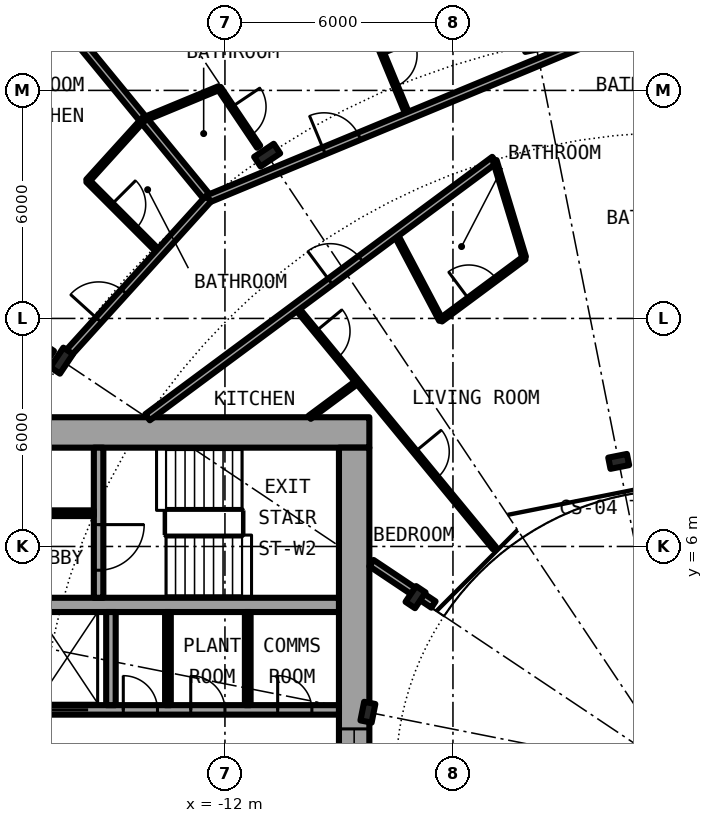
"""IFC4 building model, lengths in metres.
Left out: names, types, materials, properties, quantities, classifications, styles, units other than length and angle.
Written with IfcOpenShell. Run it as: python <this file> out.ifc"""

import sys

from ifc_helpers import new_model, si_unit, direction, frame, frame_2d, origin, origin_2d, place, context, subcontext, project, spatial, rectangle, i_section, extrude, element, fill, save


model = new_model("IFC4")
c1 = context("Model", 3, precision=1e-05, world=origin(), true_north=direction((0.0, 1.0)))
c2 = subcontext(c1, "Body", "Model", "MODEL_VIEW")
j1 = project(units=[si_unit("LENGTHUNIT", "METRE"), si_unit("PLANEANGLEUNIT", "RADIAN")], contexts=[c1])
p1 = place(None, origin())
s1 = spatial("IfcSite", under=j1, at=p1, CompositionType="ELEMENT")
p2 = place(p1, origin())
s2 = spatial("IfcBuilding", under=s1, at=p2, CompositionType="ELEMENT")
p3 = place(p2, frame((0.0, 0.0, 47.2)))
s3 = spatial("IfcBuildingStorey", under=s2, at=p3, CompositionType="ELEMENT", Elevation=47.2)
for number, where, z_axis, x_axis in (
    (1, (-10.889, 16.297, 0.0), (0.0, 0.0, 1.0), (-0.556, 0.831, 0.0)),
    (2, (-16.297, 10.889, 0.0), (0.0, 0.0, 1.0), (-0.831, 0.556, 0.0)),
):
    element("IfcColumn", number, at=place(p3, frame(where, z_axis=z_axis, x_axis=x_axis)), inside=s3, PredefinedType="COLUMN", context=c2, shape_type="SweptSolid", body=[
        extrude(i_section(OverallWidth=0.305, OverallDepth=0.62, WebThickness=0.021, FlangeThickness=0.04, FilletRadius=0.027, at=origin_2d()), origin(), (0.0, 0.0, 1.0), 3.05),
    ])
for number, where, z_axis, x_axis in (
    (3, (-1.639, 8.239, 0.0), (0.0, 0.0, 1.0), (-0.195, 0.981, 0.0)),
    (4, (-6.984, 4.667, 0.0), (0.0, 0.0, 1.0), (-0.831, 0.556, 0.0)),
    (5, (-8.239, 1.639, 0.0), (0.0, 0.0, 1.0), (-0.981, 0.195, 0.0)),
):
    element("IfcColumn", number, at=place(p3, frame(where, z_axis=z_axis, x_axis=x_axis)), inside=s3, PredefinedType="COLUMN", context=c2, shape_type="SweptSolid", body=[
        extrude(i_section(OverallWidth=0.3, OverallDepth=0.5, WebThickness=0.014, FlangeThickness=0.028, FilletRadius=0.027, at=origin_2d()), origin(), (0.0, 0.0, 1.0), 3.05),
    ])
p4 = place(p3, frame((-8.2, 9.0, 0.0), z_axis=(0.0, 0.0, 1.0), x_axis=(-1.0, 0.0, 0.0)))
e6 = element("IfcWall", 6, at=p4, inside=s3, PredefinedType="SHEAR", context=c2, shape_type="SweptSolid", body=[
    extrude(rectangle(XDim=14.2, YDim=0.8, at=frame_2d((7.1, 0.0))), origin(), (0.0, 0.0, 1.0), 3.05),
])
p5 = place(p4, frame((11.675, 0.0, 0.0)))
e7 = element("IfcOpeningElement", 7, at=p5, cuts=e6, PredefinedType="OPENING", context=c2, shape_type="SweptSolid", body=[
    extrude(rectangle(XDim=1.2, YDim=2.3, at=frame_2d((0.6, 1.15))), frame((0.0, 0.41, 0.0), z_axis=(0.0, -1.0, 0.0), x_axis=(1.0, 0.0, 0.0)), (0.0, 0.0, 1.0), 0.82),
])
p6 = place(p3, frame((-8.6, 8.6, 0.0), z_axis=(0.0, 0.0, 1.0), x_axis=(0.0, -1.0, 0.0)))
e8 = element("IfcWall", 8, at=p6, inside=s3, PredefinedType="SHEAR", context=c2, shape_type="SweptSolid", body=[
    extrude(rectangle(XDim=17.2, YDim=0.8, at=frame_2d((8.6, 0.0))), origin(), (0.0, 0.0, 1.0), 3.05),
])
p7 = place(p6, frame((7.4, 0.0, 0.1)))
e9 = element("IfcOpeningElement", 9, at=p7, cuts=e8, PredefinedType="OPENING", context=c2, shape_type="SweptSolid", body=[
    extrude(rectangle(XDim=2.4, YDim=2.2, at=frame_2d((1.2, 1.1))), frame((0.0, 0.41, 0.0), z_axis=(0.0, -1.0, 0.0), x_axis=(1.0, 0.0, 0.0)), (0.0, 0.0, 1.0), 0.82),
])
p8 = place(p3, frame((-19.15, 1.7, 0.0), z_axis=(0.0, 0.0, 1.0), x_axis=(1.0, 0.0, 0.0)))
e10 = element("IfcWall", 10, at=p8, inside=s3, PredefinedType="SHEAR", context=c2, shape_type="SweptSolid", body=[
    extrude(rectangle(XDim=10.15, YDim=0.25, at=frame_2d((5.075, 0.0))), origin(), (0.0, 0.0, 1.0), 3.05),
])
p9 = place(p8, frame((2.45, 0.0, 0.0)))
e11 = element("IfcOpeningElement", 11, at=p9, cuts=e10, PredefinedType="OPENING", context=c2, shape_type="SweptSolid", body=[
    extrude(rectangle(XDim=1.1, YDim=2.3, at=frame_2d((0.55, 1.15))), frame((0.0, 0.135, 0.0), z_axis=(0.0, -1.0, 0.0), x_axis=(1.0, 0.0, 0.0)), (0.0, 0.0, 1.0), 0.27),
])
p10 = place(p8, frame((8.538, 0.0, 0.0)))
e12 = element("IfcOpeningElement", 12, at=p10, cuts=e10, PredefinedType="OPENING", context=c2, shape_type="SweptSolid", body=[
    extrude(rectangle(XDim=0.9, YDim=2.3, at=frame_2d((0.45, 1.15))), frame((0.0, 0.135, 0.0), z_axis=(0.0, -1.0, 0.0), x_axis=(1.0, 0.0, 0.0)), (0.0, 0.0, 1.0), 0.27),
])
p11 = place(p8, frame((6.25, 0.0, 0.0)))
e13 = element("IfcOpeningElement", 13, at=p11, cuts=e10, PredefinedType="OPENING", context=c2, shape_type="SweptSolid", body=[
    extrude(rectangle(XDim=0.9, YDim=2.3, at=frame_2d((0.45, 1.15))), frame((0.0, 0.135, 0.0), z_axis=(0.0, -1.0, 0.0), x_axis=(1.0, 0.0, 0.0)), (0.0, 0.0, 1.0), 0.27),
])
p12 = place(p8, frame((4.475, 0.0, 0.0)))
e14 = element("IfcOpeningElement", 14, at=p12, cuts=e10, PredefinedType="OPENING", context=c2, shape_type="SweptSolid", body=[
    extrude(rectangle(XDim=0.9, YDim=2.3, at=frame_2d((0.45, 1.15))), frame((0.0, 0.135, 0.0), z_axis=(0.0, -1.0, 0.0), x_axis=(1.0, 0.0, 0.0)), (0.0, 0.0, 1.0), 0.27),
])
p13 = place(p3, frame((-9.0, 4.462, 0.0), z_axis=(0.0, 0.0, 1.0), x_axis=(-1.0, 0.0, 0.0)))
e15 = element("IfcWall", 15, at=p13, inside=s3, PredefinedType="SHEAR", context=c2, shape_type="SweptSolid", body=[
    extrude(rectangle(XDim=10.15, YDim=0.375, at=frame_2d((5.075, 0.0))), origin(), (0.0, 0.0, 1.0), 3.05),
])
p14 = place(p3, frame((-15.325, 8.6, 0.0), z_axis=(0.0, 0.0, 1.0), x_axis=(0.0, -1.0, 0.0)))
e16 = element("IfcWall", 16, at=p14, inside=s3, PredefinedType="SHEAR", context=c2, shape_type="SweptSolid", body=[
    extrude(rectangle(XDim=3.95, YDim=0.25, at=frame_2d((1.975, 0.0))), origin(), (0.0, 0.0, 1.0), 3.05),
])
p15 = place(p14, frame((2.025, 0.0, 0.0)))
e17 = element("IfcOpeningElement", 17, at=p15, cuts=e16, PredefinedType="OPENING", context=c2, shape_type="SweptSolid", body=[
    extrude(rectangle(XDim=1.2, YDim=2.3, at=frame_2d((0.6, 1.15))), frame((0.0, 0.135, 0.0), z_axis=(0.0, -1.0, 0.0), x_axis=(1.0, 0.0, 0.0)), (0.0, 0.0, 1.0), 0.27),
])
p16 = place(p3, frame((-15.0, 1.825, 0.0), z_axis=(0.0, 0.0, 1.0), x_axis=(0.0, 1.0, 0.0)))
e18 = element("IfcWall", 18, at=p16, inside=s3, PredefinedType="SOLIDWALL", context=c2, shape_type="SweptSolid", body=[
    extrude(rectangle(XDim=2.45, YDim=0.25, at=frame_2d((1.225, 0.0))), origin(), (0.0, 0.0, 1.0), 2.7),
])
for number, where, z_axis, x_axis in (
    (19, (-11.4, 1.825, 0.0), (0.0, 0.0, 1.0), (0.0, 1.0, 0.0)),
    (20, (-13.5, 1.825, 0.0), (0.0, 0.0, 1.0), (0.0, 1.0, 0.0)),
):
    element("IfcWall", number, at=place(p3, frame(where, z_axis=z_axis, x_axis=x_axis)), inside=s3, PredefinedType="PARTITIONING", context=c2, shape_type="SweptSolid", body=[
        extrude(rectangle(XDim=2.45, YDim=0.15, at=frame_2d((1.225, 0.0))), origin(), (0.0, 0.0, 1.0), 2.7),
    ])
p17 = place(p3, frame((-15.45, 6.875, 0.0), z_axis=(0.0, 0.0, 1.0), x_axis=(-1.0, 0.0, 0.0)))
e21 = element("IfcWall", 21, at=p17, inside=s3, PredefinedType="PARTITIONING", context=c2, shape_type="SweptSolid", body=[
    extrude(rectangle(XDim=3.7, YDim=0.15, at=frame_2d((1.85, 0.0))), origin(), (0.0, 0.0, 1.0), 2.7),
])
p18 = place(p17, frame((1.4, 0.0, 0.0)))
e22 = element("IfcOpeningElement", 22, at=p18, cuts=e21, PredefinedType="OPENING", context=c2, shape_type="SweptSolid", body=[
    extrude(rectangle(XDim=0.9, YDim=2.3, at=frame_2d((0.45, 1.15))), frame((0.0, 0.085, 0.0), z_axis=(0.0, -1.0, 0.0), x_axis=(1.0, 0.0, 0.0)), (0.0, 0.0, 1.0), 0.17),
])
p19 = place(p3, frame((-10.398, 25.107, 0.0), z_axis=(0.0, 0.0, 1.0), x_axis=(0.382458509789, -0.923972666419, 0.0)))
e23 = element("IfcWall", 23, at=p19, inside=s3, PredefinedType="PARTITIONING", context=c2, shape_type="SweptSolid", body=[
    extrude(rectangle(XDim=8.419, YDim=0.1, at=frame_2d((4.209, 0.0))), origin(), (0.0, 0.0, 1.0), 2.7),
])
p20 = place(p19, frame((6.677, 0.0, 0.0)))
e24 = element("IfcOpeningElement", 24, at=p20, cuts=e23, PredefinedType="OPENING", context=c2, shape_type="SweptSolid", body=[
    extrude(rectangle(XDim=0.9, YDim=2.3, at=frame_2d((0.45, 1.15))), frame((0.0, 0.06, 0.0), z_axis=(0.0, -1.0, 0.0), x_axis=(1.0, 0.0, 0.0)), (0.0, 0.0, 1.0), 0.12),
])
p21 = place(p19, frame((2.468, 0.0, 0.0)))
e25 = element("IfcOpeningElement", 25, at=p21, cuts=e23, PredefinedType="OPENING", context=c2, shape_type="SweptSolid", body=[
    extrude(rectangle(XDim=0.9, YDim=2.3, at=frame_2d((0.45, 1.15))), frame((0.0, 0.06, 0.0), z_axis=(0.0, -1.0, 0.0), x_axis=(1.0, 0.0, 0.0)), (0.0, 0.0, 1.0), 0.12),
])
p22 = place(p3, frame((-22.596, 15.097, 0.0), z_axis=(0.0, 0.0, 1.0), x_axis=(0.831507055747, -0.555514190857, 0.0)))
e26 = element("IfcWall", 26, at=p22, inside=s3, PredefinedType="PARTITIONING", context=c2, shape_type="SweptSolid", body=[
    extrude(rectangle(XDim=7.265, YDim=0.2, at=frame_2d((3.633, 0.0))), origin(), (0.0, 0.0, 1.0), 2.7),
])
p23 = place(p3, frame((-17.243, 21.005, 0.0), z_axis=(0.0, 0.0, 1.0), x_axis=(0.63447412651, -0.772944100689, 0.0)))
e27 = element("IfcWall", 27, at=p23, inside=s3, PredefinedType="PARTITIONING", context=c2, shape_type="SweptSolid", body=[
    extrude(rectangle(XDim=7.576, YDim=0.2, at=frame_2d((3.788, 0.0))), origin(), (0.0, 0.0, 1.0), 2.7),
])
p24 = place(p3, frame((-15.612, 15.622, 0.0), z_axis=(0.0, 0.0, 1.0), x_axis=(0.706741540154, -0.707471833659, 0.0)))
e28 = element("IfcWall", 28, at=p24, inside=s3, PredefinedType="PARTITIONING", context=c2, shape_type="SweptSolid", body=[
    extrude(rectangle(XDim=2.674, YDim=0.1, at=frame_2d((1.337, 0.0))), origin(), (0.0, 0.0, 1.0), 2.7),
])
p25 = place(p24, frame((0.887, 0.0, 0.0)))
e29 = element("IfcOpeningElement", 29, at=p25, cuts=e28, PredefinedType="OPENING", context=c2, shape_type="SweptSolid", body=[
    extrude(rectangle(XDim=0.9, YDim=2.3, at=frame_2d((0.45, 1.15))), frame((0.0, 0.06, 0.0), z_axis=(0.0, -1.0, 0.0), x_axis=(1.0, 0.0, 0.0)), (0.0, 0.0, 1.0), 0.12),
])
p26 = place(p3, frame((-12.153, 18.064, 0.0), z_axis=(0.0, 0.0, 1.0), x_axis=(0.558084773293, -0.829783939239, 0.0)))
e30 = element("IfcWall", 30, at=p26, inside=s3, PredefinedType="PARTITIONING", context=c2, shape_type="SweptSolid", body=[
    extrude(rectangle(XDim=1.862, YDim=0.1, at=frame_2d((0.931, 0.0))), origin(), (0.0, 0.0, 1.0), 2.7),
])
p27 = place(p26, frame((0.6, 0.0, 0.0)))
e31 = element("IfcOpeningElement", 31, at=p27, cuts=e30, PredefinedType="OPENING", context=c2, shape_type="SweptSolid", body=[
    extrude(rectangle(XDim=0.9, YDim=2.3, at=frame_2d((0.45, 1.15))), frame((0.0, 0.06, 0.0), z_axis=(0.0, -1.0, 0.0), x_axis=(1.0, 0.0, 0.0)), (0.0, 0.0, 1.0), 0.12),
])
p28 = place(p3, frame((-10.132, 12.296, 0.0), z_axis=(0.0, 0.0, 1.0), x_axis=(0.635976043025, -0.771708800454, 0.0)))
e32 = element("IfcWall", 32, at=p28, inside=s3, PredefinedType="PARTITIONING", context=c2, shape_type="SweptSolid", body=[
    extrude(rectangle(XDim=8.213, YDim=0.1, at=frame_2d((4.106, 0.0))), origin(), (0.0, 0.0, 1.0), 2.7),
])
p29 = place(p28, frame((0.823, 0.0, 0.0)))
e33 = element("IfcOpeningElement", 33, at=p29, cuts=e32, PredefinedType="OPENING", context=c2, shape_type="SweptSolid", body=[
    extrude(rectangle(XDim=0.9, YDim=2.3, at=frame_2d((0.45, 1.15))), frame((0.0, 0.06, 0.0), z_axis=(0.0, -1.0, 0.0), x_axis=(1.0, 0.0, 0.0)), (0.0, 0.0, 1.0), 0.12),
])
p30 = place(p28, frame((4.929, 0.0, 0.0)))
e34 = element("IfcOpeningElement", 34, at=p30, cuts=e32, PredefinedType="OPENING", context=c2, shape_type="SweptSolid", body=[
    extrude(rectangle(XDim=0.9, YDim=2.3, at=frame_2d((0.45, 1.15))), frame((0.0, 0.06, 0.0), z_axis=(0.0, -1.0, 0.0), x_axis=(1.0, 0.0, 0.0)), (0.0, 0.0, 1.0), 0.12),
])
p31 = place(p3, frame((-7.519, 14.234, 0.0), z_axis=(0.0, 0.0, 1.0), x_axis=(0.467001992543, -0.884256263173, 0.0)))
e35 = element("IfcWall", 35, at=p31, inside=s3, PredefinedType="PARTITIONING", context=c2, shape_type="SweptSolid", body=[
    extrude(rectangle(XDim=2.572, YDim=0.1, at=frame_2d((1.286, 0.0))), origin(), (0.0, 0.0, 1.0), 2.7),
])
p32 = place(p3, frame((-6.513, 4.472, 0.0), z_axis=(0.0, 0.0, 1.0), x_axis=(-0.831417956244, 0.555647533996, 0.0)))
e36 = element("IfcWall", 36, at=p32, inside=s3, PredefinedType="PARTITIONING", context=c2, shape_type="SweptSolid", body=[
    extrude(rectangle(XDim=1.962, YDim=0.2, at=frame_2d((0.981, 0.0))), origin(), (0.0, 0.0, 1.0), 2.7),
])
p33 = place(p3, frame((-9.772, 9.398, 0.0), z_axis=(0.0, 0.0, 1.0), x_axis=(0.803264156882, 0.595622946392, 0.0)))
e37 = element("IfcWall", 37, at=p33, inside=s3, PredefinedType="PARTITIONING", context=c2, shape_type="SweptSolid", body=[
    extrude(rectangle(XDim=1.565, YDim=0.1, at=frame_2d((0.782, 0.0))), origin(), (0.0, 0.0, 1.0), 2.7),
])
p34 = place(p3, frame((-6.318, 11.96, 0.0), z_axis=(0.0, 0.0, 1.0), x_axis=(0.803128348509, 0.595806055542, 0.0)))
e38 = element("IfcWall", 38, at=p34, inside=s3, PredefinedType="PARTITIONING", context=c2, shape_type="SweptSolid", body=[
    extrude(rectangle(XDim=2.734, YDim=0.1, at=frame_2d((1.367, 0.0))), origin(), (0.0, 0.0, 1.0), 2.7),
])
p35 = place(p34, frame((0.917, 0.0, 0.0)))
e39 = element("IfcOpeningElement", 39, at=p35, cuts=e38, PredefinedType="OPENING", context=c2, shape_type="SweptSolid", body=[
    extrude(rectangle(XDim=0.9, YDim=2.3, at=frame_2d((0.45, 1.15))), frame((0.0, 0.06, 0.0), z_axis=(0.0, -1.0, 0.0), x_axis=(1.0, 0.0, 0.0)), (0.0, 0.0, 1.0), 0.12),
])
p36 = place(p3, frame((-14.037, 9.4, 0.0), z_axis=(0.0, 0.0, 1.0), x_axis=(0.803202106898, 0.595706618626, 0.0)))
e40 = element("IfcWall", 40, at=p36, inside=s3, PredefinedType="PARTITIONING", context=c2, shape_type="SweptSolid", body=[
    extrude(rectangle(XDim=11.368, YDim=0.2, at=frame_2d((5.684, 0.0))), origin(), (0.0, 0.0, 1.0), 2.7),
])
p37 = place(p36, frame((5.988, 0.0, 0.0)))
e41 = element("IfcOpeningElement", 41, at=p37, cuts=e40, PredefinedType="OPENING", context=c2, shape_type="SweptSolid", body=[
    extrude(rectangle(XDim=1.0, YDim=2.3, at=frame_2d((0.5, 1.15))), frame((0.0, 0.11, 0.0), z_axis=(0.0, -1.0, 0.0), x_axis=(1.0, 0.0, 0.0)), (0.0, 0.0, 1.0), 0.22),
])
p38 = place(p3, frame((-12.435, 15.15, 0.0), z_axis=(0.0, 0.0, 1.0), x_axis=(0.923845560554, 0.38276543763, 0.0)))
e42 = element("IfcWall", 42, at=p38, inside=s3, PredefinedType="PARTITIONING", context=c2, shape_type="SweptSolid", body=[
    extrude(rectangle(XDim=11.381, YDim=0.2, at=frame_2d((5.69, 0.0))), origin(), (0.0, 0.0, 1.0), 2.7),
])
p39 = place(p38, frame((3.293, 0.0, 0.0)))
e43 = element("IfcOpeningElement", 43, at=p39, cuts=e42, PredefinedType="OPENING", context=c2, shape_type="SweptSolid", body=[
    extrude(rectangle(XDim=1.0, YDim=2.3, at=frame_2d((0.5, 1.15))), frame((0.0, 0.11, 0.0), z_axis=(0.0, -1.0, 0.0), x_axis=(1.0, 0.0, 0.0)), (0.0, 0.0, 1.0), 0.22),
])
p40 = place(p3, frame((-1.921, 19.506, 0.0), z_axis=(0.0, 0.0, 1.0), x_axis=(0.989134446023, -0.147013767014, 0.0)))
e44 = element("IfcWall", 44, at=p40, inside=s3, PredefinedType="PARTITIONING", context=c2, shape_type="SweptSolid", body=[
    extrude(rectangle(XDim=9.531, YDim=0.2, at=frame_2d((4.765, 0.0))), origin(), (0.0, 0.0, 1.0), 2.38),
])
p41 = place(p40, frame((3.31, 0.0, 0.0)))
e45 = element("IfcOpeningElement", 45, at=p41, cuts=e44, PredefinedType="OPENING", context=c2, shape_type="SweptSolid", body=[
    extrude(rectangle(XDim=1.0, YDim=2.3, at=frame_2d((0.5, 1.15))), frame((0.0, 0.11, 0.0), z_axis=(0.0, -1.0, 0.0), x_axis=(1.0, 0.0, 0.0)), (0.0, 0.0, 1.0), 0.22),
])
p42 = place(p3, frame((-16.193, 11.003, 0.0), z_axis=(0.0, 0.0, 1.0), x_axis=(0.671514934772, 0.740991020444, 0.0)))
e46 = element("IfcWall", 46, at=p42, inside=s3, PredefinedType="PARTITIONING", context=c2, shape_type="SweptSolid", body=[
    extrude(rectangle(XDim=5.598, YDim=0.2, at=frame_2d((2.799, 0.0))), origin(), (0.0, 0.0, 1.0), 2.38),
])
p43 = place(p42, frame((1.293, 0.0, 0.0)))
e47 = element("IfcOpeningElement", 47, at=p43, cuts=e46, PredefinedType="OPENING", context=c2, shape_type="SweptSolid", body=[
    extrude(rectangle(XDim=1.0, YDim=2.3, at=frame_2d((0.5, 1.15))), frame((0.0, 0.11, 0.0), z_axis=(0.0, -1.0, 0.0), x_axis=(1.0, 0.0, 0.0)), (0.0, 0.0, 1.0), 0.22),
])
p44 = place(p3, frame((-14.149, 17.236, 0.0), z_axis=(0.0, 0.0, 1.0), x_axis=(0.923874819588, 0.382694810171, 0.0)))
e48 = element("IfcWall", 48, at=p44, inside=s3, PredefinedType="PARTITIONING", context=c2, shape_type="SweptSolid", body=[
    extrude(rectangle(XDim=2.158, YDim=0.1, at=frame_2d((1.079, 0.0))), origin(), (0.0, 0.0, 1.0), 2.7),
])
p45 = place(p3, frame((-15.613, 15.621, 0.0), z_axis=(0.0, 0.0, 1.0), x_axis=(0.67169789574, 0.740825172937, 0.0)))
e49 = element("IfcWall", 49, at=p45, inside=s3, PredefinedType="PARTITIONING", context=c2, shape_type="SweptSolid", body=[
    extrude(rectangle(XDim=2.183, YDim=0.1, at=frame_2d((1.091, 0.0))), origin(), (0.0, 0.0, 1.0), 2.7),
])
p46 = place(p3, frame((-4.9, 16.152, 0.0), z_axis=(0.0, 0.0, 1.0), x_axis=(0.290456070925, -0.956888327269, 0.0)))
e50 = element("IfcWall", 50, at=p46, inside=s3, PredefinedType="PARTITIONING", context=c2, shape_type="SweptSolid", body=[
    extrude(rectangle(XDim=2.658, YDim=0.1, at=frame_2d((1.329, 0.0))), origin(), (0.0, 0.0, 1.0), 2.7),
])
p47 = place(p9, origin())
e51 = element("IfcDoor", 51, at=p47, inside=s3, OperationType="DOUBLE_DOOR_SLIDING", PredefinedType="DOOR", context=c2, shape_type="SweptSolid", body=[
    extrude(rectangle(XDim=1.1, YDim=2.3, at=frame_2d((0.55, 1.15))), frame((0.0, 0.025, 0.0), z_axis=(0.0, -1.0, 0.0), x_axis=(1.0, 0.0, 0.0)), (0.0, 0.0, 1.0), 0.05),
])
fill(e11, e51)
p48 = place(p10, origin())
e52 = element("IfcDoor", 52, at=p48, inside=s3, OperationType="SINGLE_SWING_LEFT", PredefinedType="DOOR", context=c2, shape_type="SweptSolid", body=[
    extrude(rectangle(XDim=0.9, YDim=2.3, at=frame_2d((0.45, 1.15))), frame((0.0, 0.025, 0.0), z_axis=(0.0, -1.0, 0.0), x_axis=(1.0, 0.0, 0.0)), (0.0, 0.0, 1.0), 0.05),
])
fill(e12, e52)
p49 = place(p11, origin())
e53 = element("IfcDoor", 53, at=p49, inside=s3, OperationType="SINGLE_SWING_LEFT", PredefinedType="DOOR", context=c2, shape_type="SweptSolid", body=[
    extrude(rectangle(XDim=0.9, YDim=2.3, at=frame_2d((0.45, 1.15))), frame((0.0, 0.025, 0.0), z_axis=(0.0, -1.0, 0.0), x_axis=(1.0, 0.0, 0.0)), (0.0, 0.0, 1.0), 0.05),
])
fill(e13, e53)
p50 = place(p12, origin())
e54 = element("IfcDoor", 54, at=p50, inside=s3, OperationType="SINGLE_SWING_RIGHT", PredefinedType="DOOR", context=c2, shape_type="SweptSolid", body=[
    extrude(rectangle(XDim=0.9, YDim=2.3, at=frame_2d((0.45, 1.15))), frame((0.0, 0.025, 0.0), z_axis=(0.0, -1.0, 0.0), x_axis=(1.0, 0.0, 0.0)), (0.0, 0.0, 1.0), 0.05),
])
fill(e14, e54)
p51 = place(p15, origin())
e55 = element("IfcDoor", 55, at=p51, inside=s3, OperationType="SINGLE_SWING_LEFT", PredefinedType="DOOR", context=c2, shape_type="SweptSolid", body=[
    extrude(rectangle(XDim=1.2, YDim=2.3, at=frame_2d((0.6, 1.15))), frame((0.0, 0.025, 0.0), z_axis=(0.0, -1.0, 0.0), x_axis=(1.0, 0.0, 0.0)), (0.0, 0.0, 1.0), 0.05),
])
fill(e17, e55)
p52 = place(p7, origin())
e56 = element("IfcWindow", 56, at=p52, inside=s3, PartitioningType="SINGLE_PANEL", PredefinedType="WINDOW", context=c2, shape_type="SweptSolid", body=[
    extrude(rectangle(XDim=2.4, YDim=2.2, at=frame_2d((1.2, 1.1))), frame((0.0, 0.03, 0.0), z_axis=(0.0, -1.0, 0.0), x_axis=(1.0, 0.0, 0.0)), (0.0, 0.0, 1.0), 0.06),
])
fill(e9, e56)
p53 = place(p39, origin())
e57 = element("IfcDoor", 57, at=p53, inside=s3, OperationType="SINGLE_SWING_LEFT", PredefinedType="DOOR", context=c2, shape_type="SweptSolid", body=[
    extrude(rectangle(XDim=1.0, YDim=2.3, at=frame_2d((0.5, 1.15))), frame((0.0, 0.025, 0.0), z_axis=(0.0, -1.0, 0.0), x_axis=(1.0, 0.0, 0.0)), (0.0, 0.0, 1.0), 0.05),
])
fill(e43, e57)
p54 = place(p27, origin())
e58 = element("IfcDoor", 58, at=p54, inside=s3, OperationType="SINGLE_SWING_RIGHT", PredefinedType="DOOR", context=c2, shape_type="SweptSolid", body=[
    extrude(rectangle(XDim=0.9, YDim=2.3, at=frame_2d((0.45, 1.15))), frame((0.0, 0.025, 0.0), z_axis=(0.0, -1.0, 0.0), x_axis=(1.0, 0.0, 0.0)), (0.0, 0.0, 1.0), 0.05),
])
fill(e31, e58)
p55 = place(p20, origin())
e59 = element("IfcDoor", 59, at=p55, inside=s3, OperationType="SINGLE_SWING_RIGHT", PredefinedType="DOOR", context=c2, shape_type="SweptSolid", body=[
    extrude(rectangle(XDim=0.9, YDim=2.3, at=frame_2d((0.45, 1.15))), frame((0.0, 0.025, 0.0), z_axis=(0.0, -1.0, 0.0), x_axis=(1.0, 0.0, 0.0)), (0.0, 0.0, 1.0), 0.05),
])
fill(e24, e59)
p56 = place(p43, origin())
e60 = element("IfcDoor", 60, at=p56, inside=s3, OperationType="SINGLE_SWING_LEFT", PredefinedType="DOOR", context=c2, shape_type="SweptSolid", body=[
    extrude(rectangle(XDim=1.0, YDim=2.3, at=frame_2d((0.5, 1.15))), frame((0.0, 0.025, 0.0), z_axis=(0.0, -1.0, 0.0), x_axis=(1.0, 0.0, 0.0)), (0.0, 0.0, 1.0), 0.05),
])
fill(e47, e60)
p57 = place(p25, origin())
e61 = element("IfcDoor", 61, at=p57, inside=s3, OperationType="SINGLE_SWING_RIGHT", PredefinedType="DOOR", context=c2, shape_type="SweptSolid", body=[
    extrude(rectangle(XDim=0.9, YDim=2.3, at=frame_2d((0.45, 1.15))), frame((0.0, 0.025, 0.0), z_axis=(0.0, -1.0, 0.0), x_axis=(1.0, 0.0, 0.0)), (0.0, 0.0, 1.0), 0.05),
])
fill(e29, e61)
p58 = place(p37, origin())
e62 = element("IfcDoor", 62, at=p58, inside=s3, OperationType="SINGLE_SWING_RIGHT", PredefinedType="DOOR", context=c2, shape_type="SweptSolid", body=[
    extrude(rectangle(XDim=1.0, YDim=2.3, at=frame_2d((0.5, 1.15))), frame((0.0, 0.025, 0.0), z_axis=(0.0, -1.0, 0.0), x_axis=(1.0, 0.0, 0.0)), (0.0, 0.0, 1.0), 0.05),
])
fill(e41, e62)
p59 = place(p35, origin())
e63 = element("IfcDoor", 63, at=p59, inside=s3, OperationType="SINGLE_SWING_RIGHT", PredefinedType="DOOR", context=c2, shape_type="SweptSolid", body=[
    extrude(rectangle(XDim=0.9, YDim=2.3, at=frame_2d((0.45, 1.15))), frame((0.0, 0.025, 0.0), z_axis=(0.0, -1.0, 0.0), x_axis=(1.0, 0.0, 0.0)), (0.0, 0.0, 1.0), 0.05),
])
fill(e39, e63)
p60 = place(p29, origin())
e64 = element("IfcDoor", 64, at=p60, inside=s3, OperationType="SINGLE_SWING_LEFT", PredefinedType="DOOR", context=c2, shape_type="SweptSolid", body=[
    extrude(rectangle(XDim=0.9, YDim=2.3, at=frame_2d((0.45, 1.15))), frame((0.0, 0.025, 0.0), z_axis=(0.0, -1.0, 0.0), x_axis=(1.0, 0.0, 0.0)), (0.0, 0.0, 1.0), 0.05),
])
fill(e33, e64)
p61 = place(p30, origin())
e65 = element("IfcDoor", 65, at=p61, inside=s3, OperationType="SINGLE_SWING_RIGHT", PredefinedType="DOOR", context=c2, shape_type="SweptSolid", body=[
    extrude(rectangle(XDim=0.9, YDim=2.3, at=frame_2d((0.45, 1.15))), frame((0.0, 0.025, 0.0), z_axis=(0.0, -1.0, 0.0), x_axis=(1.0, 0.0, 0.0)), (0.0, 0.0, 1.0), 0.05),
])
fill(e34, e65)
save(model, sys.argv[1])
